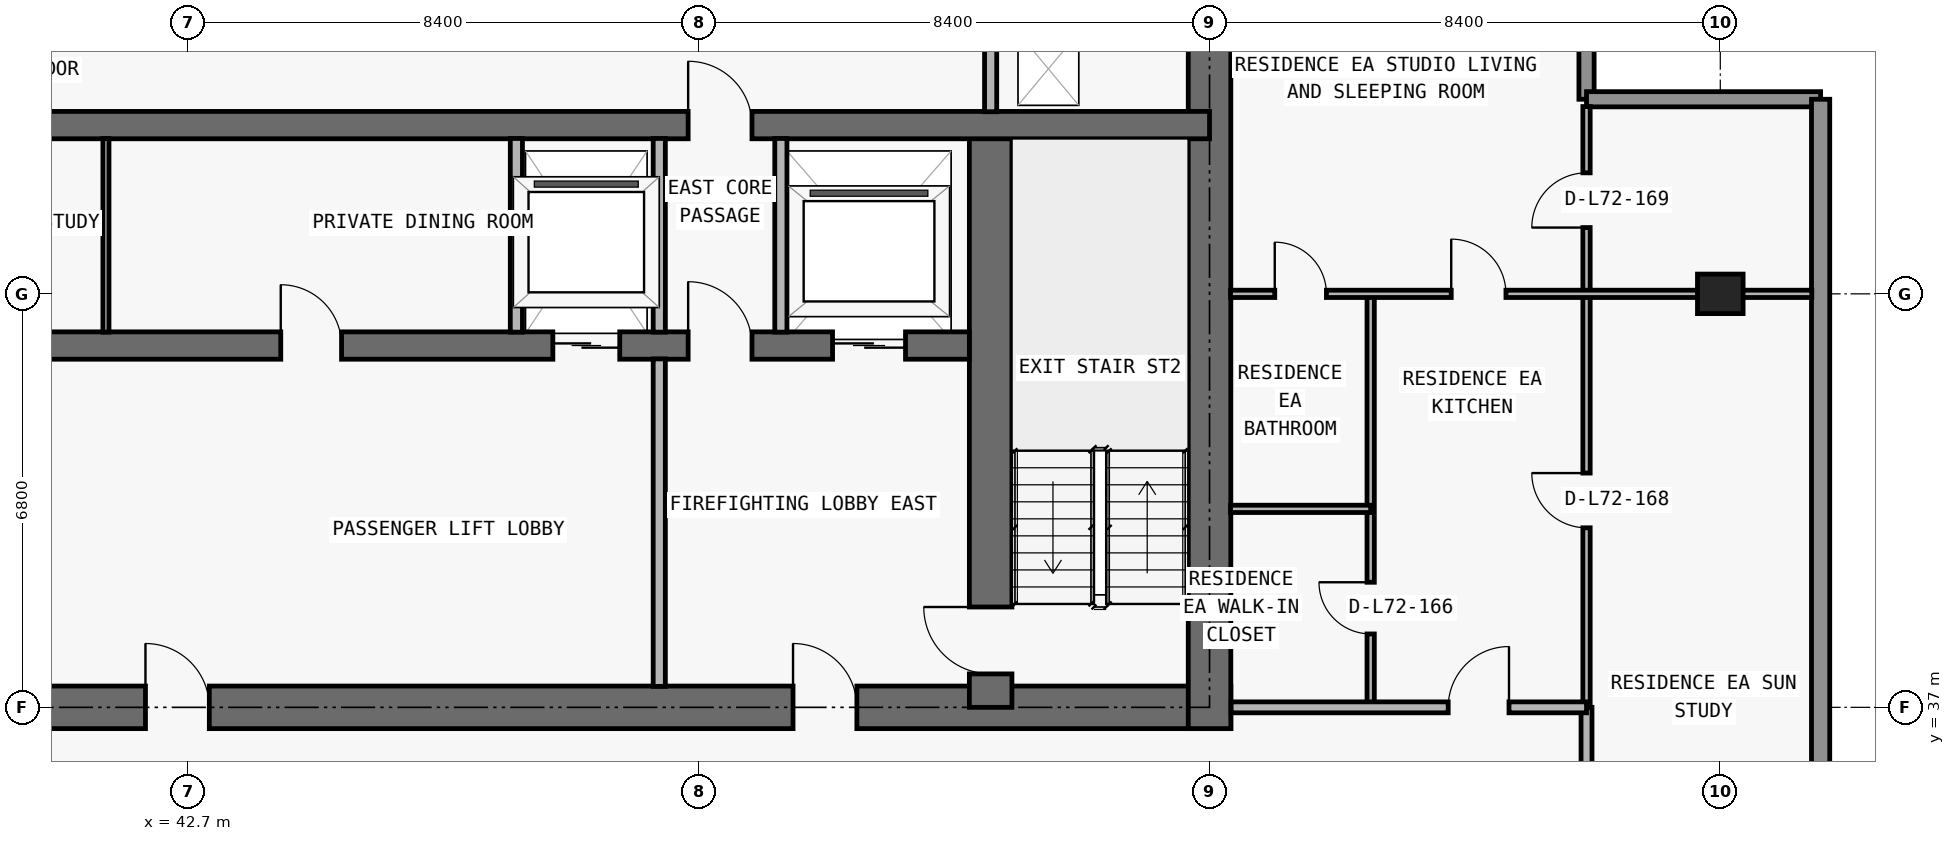
"""IFC4 building model, lengths in metres.
Left out: names, types, materials, properties, quantities, classifications, styles, units other than length and angle.
Written with IfcOpenShell. Run it as: python <this file> out.ifc"""

import sys

from ifc_helpers import new_model, si_unit, direction, frame, frame_2d, origin, origin_2d, place, context, subcontext, project, spatial, rectangle, extrude, element, fill, save


model = new_model("IFC4")
c1 = context("Model", 3, precision=1e-05, world=origin(), true_north=direction((0.0, 1.0)))
c2 = subcontext(c1, "Body", "Model", "MODEL_VIEW")
j1 = project(units=[si_unit("LENGTHUNIT", "METRE"), si_unit("PLANEANGLEUNIT", "RADIAN")], contexts=[c1])
p1 = place(None, origin())
s1 = spatial("IfcSite", under=j1, at=p1, CompositionType="ELEMENT")
p2 = place(p1, origin())
s2 = spatial("IfcBuilding", under=s1, at=p2, CompositionType="ELEMENT")
p3 = place(p2, frame((0.0, 0.0, 256.2)))
s3 = spatial("IfcBuildingStorey", under=s2, at=p3, CompositionType="ELEMENT", Elevation=256.2)
p4 = place(p3, frame((67.9, 43.8, 0.0), z_axis=(0.0, 0.0, 1.0), x_axis=(1.0, 0.0, 0.0)))
e1 = element("IfcColumn", 1, at=p4, inside=s3, PredefinedType="COLUMN", context=c2, shape_type="SweptSolid", body=[
    extrude(rectangle(XDim=0.75, YDim=0.65, at=origin_2d()), origin(), (0.0, 0.0, 1.0), 3.05),
])
p5 = place(p3, frame((17.95, 37.0, 0.0), z_axis=(0.0, 0.0, 1.0), x_axis=(1.0, 0.0, 0.0)))
e2 = element("IfcWall", 2, at=p5, inside=s3, PredefinedType="SHEAR", context=c2, shape_type="SweptSolid", body=[
    extrude(rectangle(XDim=41.9, YDim=0.7, at=frame_2d((20.95, 0.0))), origin(), (0.0, 0.0, 1.0), 3.05),
])
p6 = place(p5, frame((14.35, 0.0, 0.0)))
e3 = element("IfcOpeningElement", 3, at=p6, cuts=e2, PredefinedType="OPENING", context=c2, shape_type="SweptSolid", body=[
    extrude(rectangle(XDim=1.1, YDim=2.15, at=frame_2d((0.55, 1.075))), frame((0.0, 0.36, 0.0), z_axis=(0.0, -1.0, 0.0), x_axis=(1.0, 0.0, 0.0)), (0.0, 0.0, 1.0), 0.72),
])
p7 = place(p5, frame((6.2, 0.0, 0.0)))
e4 = element("IfcOpeningElement", 4, at=p7, cuts=e2, PredefinedType="OPENING", context=c2, shape_type="SweptSolid", body=[
    extrude(rectangle(XDim=1.05, YDim=2.15, at=frame_2d((0.525, 1.075))), frame((0.0, 0.36, 0.0), z_axis=(0.0, -1.0, 0.0), x_axis=(1.0, 0.0, 0.0)), (0.0, 0.0, 1.0), 0.72),
])
p8 = place(p5, frame((34.7, 0.0, 0.0)))
e5 = element("IfcOpeningElement", 5, at=p8, cuts=e2, PredefinedType="OPENING", context=c2, shape_type="SweptSolid", body=[
    extrude(rectangle(XDim=1.05, YDim=2.15, at=frame_2d((0.525, 1.075))), frame((0.0, 0.36, 0.0), z_axis=(0.0, -1.0, 0.0), x_axis=(1.0, 0.0, 0.0)), (0.0, 0.0, 1.0), 0.72),
])
p9 = place(p5, frame((10.812, 0.0, 0.0)))
e6 = element("IfcOpeningElement", 6, at=p9, cuts=e2, PredefinedType="OPENING", context=c2, shape_type="SweptSolid", body=[
    extrude(rectangle(XDim=1.05, YDim=2.15, at=frame_2d((0.525, 1.075))), frame((0.0, 0.36, 0.0), z_axis=(0.0, -1.0, 0.0), x_axis=(1.0, 0.0, 0.0)), (0.0, 0.0, 1.0), 0.72),
])
p10 = place(p5, frame((24.05, 0.0, 0.0)))
e7 = element("IfcOpeningElement", 7, at=p10, cuts=e2, PredefinedType="OPENING", context=c2, shape_type="SweptSolid", body=[
    extrude(rectangle(XDim=1.05, YDim=2.15, at=frame_2d((0.525, 1.075))), frame((0.0, 0.36, 0.0), z_axis=(0.0, -1.0, 0.0), x_axis=(1.0, 0.0, 0.0)), (0.0, 0.0, 1.0), 0.72),
])
p11 = place(p3, frame((59.5, 36.65, 0.0), z_axis=(0.0, 0.0, 1.0), x_axis=(0.0, 1.0, 0.0)))
e8 = element("IfcWall", 8, at=p11, inside=s3, PredefinedType="SHEAR", context=c2, shape_type="SweptSolid", body=[
    extrude(rectangle(XDim=13.95, YDim=0.7, at=frame_2d((6.975, 0.0))), origin(), (0.0, 0.0, 1.0), 3.05),
])
p12 = place(p3, frame((55.9, 37.0, 0.0), z_axis=(0.0, 0.0, 1.0), x_axis=(0.0, 1.0, 0.0)))
e9 = element("IfcWall", 9, at=p12, inside=s3, PredefinedType="SHEAR", context=c2, shape_type="SweptSolid", body=[
    extrude(rectangle(XDim=9.575, YDim=0.7, at=frame_2d((4.788, 0.0))), origin(), (0.0, 0.0, 1.0), 3.05),
])
p13 = place(p12, frame((0.55, 0.0, 0.0)))
e10 = element("IfcOpeningElement", 10, at=p13, cuts=e9, PredefinedType="OPENING", context=c2, shape_type="SweptSolid", body=[
    extrude(rectangle(XDim=1.1, YDim=2.15, at=frame_2d((0.55, 1.075))), frame((0.0, 0.36, 0.0), z_axis=(0.0, -1.0, 0.0), x_axis=(1.0, 0.0, 0.0)), (0.0, 0.0, 1.0), 0.72),
])
p14 = place(p3, frame((22.25, 42.95, 0.0), z_axis=(0.0, 0.0, 1.0), x_axis=(1.0, 0.0, 0.0)))
e11 = element("IfcWall", 11, at=p14, inside=s3, PredefinedType="SHEAR", context=c2, shape_type="SweptSolid", body=[
    extrude(rectangle(XDim=33.3, YDim=0.45, at=frame_2d((16.65, 0.0))), origin(), (0.0, 0.0, 1.0), 3.05),
])
p15 = place(p14, frame((1.05, 0.0, 0.0)))
e12 = element("IfcOpeningElement", 12, at=p15, cuts=e11, PredefinedType="OPENING", context=c2, shape_type="SweptSolid", body=[
    extrude(rectangle(XDim=1.2, YDim=2.2, at=frame_2d((0.6, 1.1))), frame((0.0, 0.235, 0.0), z_axis=(0.0, -1.0, 0.0), x_axis=(1.0, 0.0, 0.0)), (0.0, 0.0, 1.0), 0.47),
])
p16 = place(p14, frame((31.05, 0.0, 0.0)))
e13 = element("IfcOpeningElement", 13, at=p16, cuts=e11, PredefinedType="OPENING", context=c2, shape_type="SweptSolid", body=[
    extrude(rectangle(XDim=1.2, YDim=2.2, at=frame_2d((0.6, 1.1))), frame((0.0, 0.235, 0.0), z_axis=(0.0, -1.0, 0.0), x_axis=(1.0, 0.0, 0.0)), (0.0, 0.0, 1.0), 0.47),
])
p17 = place(p14, frame((26.45, 0.0, 0.0)))
e14 = element("IfcOpeningElement", 14, at=p17, cuts=e11, PredefinedType="OPENING", context=c2, shape_type="SweptSolid", body=[
    extrude(rectangle(XDim=1.1, YDim=2.2, at=frame_2d((0.55, 1.1))), frame((0.0, 0.235, 0.0), z_axis=(0.0, -1.0, 0.0), x_axis=(1.0, 0.0, 0.0)), (0.0, 0.0, 1.0), 0.47),
])
p18 = place(p14, frame((5.95, 0.0, 0.0)))
e15 = element("IfcOpeningElement", 15, at=p18, cuts=e11, PredefinedType="OPENING", context=c2, shape_type="SweptSolid", body=[
    extrude(rectangle(XDim=1.1, YDim=2.2, at=frame_2d((0.55, 1.1))), frame((0.0, 0.235, 0.0), z_axis=(0.0, -1.0, 0.0), x_axis=(1.0, 0.0, 0.0)), (0.0, 0.0, 1.0), 0.47),
])
p19 = place(p14, frame((3.625, 0.0, 0.0)))
e16 = element("IfcOpeningElement", 16, at=p19, cuts=e11, PredefinedType="OPENING", context=c2, shape_type="SweptSolid", body=[
    extrude(rectangle(XDim=1.05, YDim=2.15, at=frame_2d((0.525, 1.075))), frame((0.0, 0.235, 0.0), z_axis=(0.0, -1.0, 0.0), x_axis=(1.0, 0.0, 0.0)), (0.0, 0.0, 1.0), 0.47),
])
p20 = place(p14, frame((28.675, 0.0, 0.0)))
e17 = element("IfcOpeningElement", 17, at=p20, cuts=e11, PredefinedType="OPENING", context=c2, shape_type="SweptSolid", body=[
    extrude(rectangle(XDim=1.05, YDim=2.15, at=frame_2d((0.525, 1.075))), frame((0.0, 0.235, 0.0), z_axis=(0.0, -1.0, 0.0), x_axis=(1.0, 0.0, 0.0)), (0.0, 0.0, 1.0), 0.47),
])
p21 = place(p14, frame((15.225, 0.0, 0.0)))
e18 = element("IfcOpeningElement", 18, at=p21, cuts=e11, PredefinedType="OPENING", context=c2, shape_type="SweptSolid", body=[
    extrude(rectangle(XDim=1.0, YDim=2.2, at=frame_2d((0.5, 1.1))), frame((0.0, 0.235, 0.0), z_axis=(0.0, -1.0, 0.0), x_axis=(1.0, 0.0, 0.0)), (0.0, 0.0, 1.0), 0.47),
])
p22 = place(p14, frame((21.975, 0.0, 0.0)))
e19 = element("IfcOpeningElement", 19, at=p22, cuts=e11, PredefinedType="OPENING", context=c2, shape_type="SweptSolid", body=[
    extrude(rectangle(XDim=1.0, YDim=2.2, at=frame_2d((0.5, 1.1))), frame((0.0, 0.235, 0.0), z_axis=(0.0, -1.0, 0.0), x_axis=(1.0, 0.0, 0.0)), (0.0, 0.0, 1.0), 0.47),
])
p23 = place(p3, frame((18.3, 46.575, 0.0), z_axis=(0.0, 0.0, 1.0), x_axis=(1.0, 0.0, 0.0)))
e20 = element("IfcWall", 20, at=p23, inside=s3, PredefinedType="SHEAR", context=c2, shape_type="SweptSolid", body=[
    extrude(rectangle(XDim=41.2, YDim=0.45, at=frame_2d((20.6, 0.0))), origin(), (0.0, 0.0, 1.0), 3.05),
])
p24 = place(p23, frame((7.575, 0.0, 0.0)))
e21 = element("IfcOpeningElement", 21, at=p24, cuts=e20, PredefinedType="OPENING", context=c2, shape_type="SweptSolid", body=[
    extrude(rectangle(XDim=1.05, YDim=2.15, at=frame_2d((0.525, 1.075))), frame((0.0, 0.235, 0.0), z_axis=(0.0, -1.0, 0.0), x_axis=(1.0, 0.0, 0.0)), (0.0, 0.0, 1.0), 0.47),
])
p25 = place(p23, frame((32.625, 0.0, 0.0)))
e22 = element("IfcOpeningElement", 22, at=p25, cuts=e20, PredefinedType="OPENING", context=c2, shape_type="SweptSolid", body=[
    extrude(rectangle(XDim=1.05, YDim=2.15, at=frame_2d((0.525, 1.075))), frame((0.0, 0.235, 0.0), z_axis=(0.0, -1.0, 0.0), x_axis=(1.0, 0.0, 0.0)), (0.0, 0.0, 1.0), 0.47),
])
p26 = place(p3, frame((65.7, 50.45, 0.0), z_axis=(0.0, 0.0, 1.0), x_axis=(0.0, -1.0, 0.0)))
e23 = element("IfcWall", 23, at=p26, inside=s3, PredefinedType="ELEMENTEDWALL", context=c2, shape_type="SweptSolid", body=[
    extrude(rectangle(XDim=3.45, YDim=0.25, at=frame_2d((1.725, 0.0))), origin(), (0.0, 0.0, 1.0), 3.05),
])
p27 = place(p3, frame((65.7, 47.0, 0.0), z_axis=(0.0, 0.0, 1.0), x_axis=(1.0, 0.0, 0.0)))
e24 = element("IfcWall", 24, at=p27, inside=s3, PredefinedType="ELEMENTEDWALL", context=c2, shape_type="SweptSolid", body=[
    extrude(rectangle(XDim=3.85, YDim=0.25, at=frame_2d((1.925, 0.0))), origin(), (0.0, 0.0, 1.0), 3.05),
])
p28 = place(p3, frame((69.55, 47.0, 0.0), z_axis=(0.0, 0.0, 1.0), x_axis=(0.0, -1.0, 0.0)))
e25 = element("IfcWall", 25, at=p28, inside=s3, PredefinedType="STANDARD", context=c2, shape_type="SweptSolid", body=[
    extrude(rectangle(XDim=16.85, YDim=0.3, at=frame_2d((8.425, 0.0))), origin(), (0.0, 0.0, 1.0), 3.05),
])
p29 = place(p3, frame((41.35, 43.17, 0.0), z_axis=(0.0, 0.0, 1.0), x_axis=(0.0, 1.0, 0.0)))
e26 = element("IfcWall", 26, at=p29, inside=s3, PredefinedType="MOVABLE", context=c2, shape_type="SweptSolid", body=[
    extrude(rectangle(XDim=3.185, YDim=0.1, at=frame_2d((1.593, 0.0))), origin(), (0.0, 0.0, 1.0), 3.05),
])
p30 = place(p3, frame((48.1, 43.17, 0.0), z_axis=(0.0, 0.0, 1.0), x_axis=(0.0, 1.0, 0.0)))
e27 = element("IfcWall", 27, at=p30, inside=s3, PredefinedType="PARTITIONING", context=c2, shape_type="SweptSolid", body=[
    extrude(rectangle(XDim=3.185, YDim=0.2, at=frame_2d((1.593, 0.0))), origin(), (0.0, 0.0, 1.0), 3.05),
])
p31 = place(p3, frame((50.45, 37.345, 0.0), z_axis=(0.0, 0.0, 1.0), x_axis=(0.0, 1.0, 0.0)))
e28 = element("IfcWall", 28, at=p31, inside=s3, PredefinedType="PARTITIONING", context=c2, shape_type="SweptSolid", body=[
    extrude(rectangle(XDim=5.385, YDim=0.2, at=frame_2d((2.692, 0.0))), origin(), (0.0, 0.0, 1.0), 3.05),
])
for number, where, z_axis, x_axis in (
    (29, (50.45, 43.17, 0.0), (0.0, 0.0, 1.0), (0.0, 1.0, 0.0)),
    (30, (52.45, 43.17, 0.0), (0.0, 0.0, 1.0), (0.0, 1.0, 0.0)),
):
    element("IfcWall", number, at=place(p3, frame(where, z_axis=z_axis, x_axis=x_axis)), inside=s3, PredefinedType="PARTITIONING", context=c2, shape_type="SweptSolid", body=[
        extrude(rectangle(XDim=3.185, YDim=0.2, at=frame_2d((1.593, 0.0))), origin(), (0.0, 0.0, 1.0), 3.05),
    ])
p32 = place(p3, frame((55.9, 46.795, 0.0), z_axis=(0.0, 0.0, 1.0), x_axis=(0.0, 1.0, 0.0)))
e31 = element("IfcWall", 31, at=p32, inside=s3, PredefinedType="PARTITIONING", context=c2, shape_type="SweptSolid", body=[
    extrude(rectangle(XDim=3.16, YDim=0.2, at=frame_2d((1.58, 0.0))), origin(), (0.0, 0.0, 1.0), 3.05),
])
p33 = place(p3, frame((62.15, 37.0, 0.0), z_axis=(0.0, 0.0, 1.0), x_axis=(0.0, 1.0, 0.0)))
e32 = element("IfcWall", 32, at=p33, inside=s3, PredefinedType="PARTITIONING", context=c2, shape_type="SweptSolid", body=[
    extrude(rectangle(XDim=6.8, YDim=0.12, at=frame_2d((3.4, 0.0))), origin(), (0.0, 0.0, 1.0), 2.679),
])
p34 = place(p33, frame((1.207, 0.0, 0.0)))
e33 = element("IfcOpeningElement", 33, at=p34, cuts=e32, PredefinedType="OPENING", context=c2, shape_type="SweptSolid", body=[
    extrude(rectangle(XDim=0.85, YDim=2.1, at=frame_2d((0.425, 1.05))), frame((0.0, 0.07, 0.0), z_axis=(0.0, -1.0, 0.0), x_axis=(1.0, 0.0, 0.0)), (0.0, 0.0, 1.0), 0.14),
])
p35 = place(p3, frame((65.7, 34.305, 0.0), z_axis=(0.0, 0.0, 1.0), x_axis=(0.0, 1.0, 0.0)))
e34 = element("IfcWall", 34, at=p35, inside=s3, PredefinedType="PARTITIONING", context=c2, shape_type="SweptSolid", body=[
    extrude(rectangle(XDim=2.695, YDim=0.18, at=frame_2d((1.348, 0.0))), origin(), (0.0, 0.0, 1.0), 3.05),
])
p36 = place(p3, frame((65.7, 37.005, 0.0), z_axis=(0.0, 0.0, 1.0), x_axis=(0.0, 1.0, 0.0)))
e35 = element("IfcWall", 35, at=p36, inside=s3, PredefinedType="PARTITIONING", context=c2, shape_type="SweptSolid", body=[
    extrude(rectangle(XDim=9.875, YDim=0.12, at=frame_2d((4.938, 0.0))), origin(), (0.0, 0.0, 1.0), 3.05),
])
p37 = place(p36, frame((2.948, 0.0, 0.0)))
e36 = element("IfcOpeningElement", 36, at=p37, cuts=e35, PredefinedType="OPENING", context=c2, shape_type="SweptSolid", body=[
    extrude(rectangle(XDim=0.9, YDim=2.15, at=frame_2d((0.45, 1.075))), frame((0.0, 0.07, 0.0), z_axis=(0.0, -1.0, 0.0), x_axis=(1.0, 0.0, 0.0)), (0.0, 0.0, 1.0), 0.14),
])
p38 = place(p36, frame((7.885, 0.0, 0.0)))
e37 = element("IfcOpeningElement", 37, at=p38, cuts=e35, PredefinedType="OPENING", context=c2, shape_type="SweptSolid", body=[
    extrude(rectangle(XDim=0.9, YDim=2.15, at=frame_2d((0.45, 1.075))), frame((0.0, 0.07, 0.0), z_axis=(0.0, -1.0, 0.0), x_axis=(1.0, 0.0, 0.0)), (0.0, 0.0, 1.0), 0.14),
])
p39 = place(p3, frame((59.855, 37.0, 0.0), z_axis=(0.0, 0.0, 1.0), x_axis=(1.0, 0.0, 0.0)))
e38 = element("IfcWall", 38, at=p39, inside=s3, PredefinedType="PARTITIONING", context=c2, shape_type="SweptSolid", body=[
    extrude(rectangle(XDim=5.845, YDim=0.18, at=frame_2d((2.922, 0.0))), origin(), (0.0, 0.0, 1.0), 3.05),
])
p40 = place(p39, frame((3.57, 0.0, 0.0)))
e39 = element("IfcOpeningElement", 39, at=p40, cuts=e38, PredefinedType="OPENING", context=c2, shape_type="SweptSolid", body=[
    extrude(rectangle(XDim=1.0, YDim=2.2, at=frame_2d((0.5, 1.1))), frame((0.0, 0.1, 0.0), z_axis=(0.0, -1.0, 0.0), x_axis=(1.0, 0.0, 0.0)), (0.0, 0.0, 1.0), 0.2),
])
p41 = place(p3, frame((59.845, 40.264, 0.0), z_axis=(0.0, 0.0, 1.0), x_axis=(1.0, 0.0, 0.0)))
e40 = element("IfcWall", 40, at=p41, inside=s3, PredefinedType="PARTITIONING", context=c2, shape_type="SweptSolid", body=[
    extrude(rectangle(XDim=2.305, YDim=0.12, at=frame_2d((1.152, 0.0))), origin(), (0.0, 0.0, 1.0), 3.05),
])
p42 = place(p3, frame((59.845, 43.8, 0.0), z_axis=(0.0, 0.0, 1.0), x_axis=(1.0, 0.0, 0.0)))
e41 = element("IfcWall", 41, at=p42, inside=s3, PredefinedType="PARTITIONING", context=c2, shape_type="SweptSolid", body=[
    extrude(rectangle(XDim=9.56, YDim=0.12, at=frame_2d((4.78, 0.0))), origin(), (0.0, 0.0, 1.0), 2.418),
])
p43 = place(p42, frame((3.63, 0.0, 0.0)))
e42 = element("IfcOpeningElement", 42, at=p43, cuts=e41, PredefinedType="OPENING", context=c2, shape_type="SweptSolid", body=[
    extrude(rectangle(XDim=0.9, YDim=2.15, at=frame_2d((0.45, 1.075))), frame((0.0, 0.07, 0.0), z_axis=(0.0, -1.0, 0.0), x_axis=(1.0, 0.0, 0.0)), (0.0, 0.0, 1.0), 0.14),
])
p44 = place(p42, frame((0.728, 0.0, 0.0)))
e43 = element("IfcOpeningElement", 43, at=p44, cuts=e41, PredefinedType="OPENING", context=c2, shape_type="SweptSolid", body=[
    extrude(rectangle(XDim=0.85, YDim=2.1, at=frame_2d((0.425, 1.05))), frame((0.0, 0.07, 0.0), z_axis=(0.0, -1.0, 0.0), x_axis=(1.0, 0.0, 0.0)), (0.0, 0.0, 1.0), 0.14),
])
p45 = place(p16, origin())
e44 = element("IfcDoor", 44, at=p45, inside=s3, OperationType="DOUBLE_DOOR_SLIDING", PredefinedType="DOOR", context=c2, shape_type="SweptSolid", body=[
    extrude(rectangle(XDim=1.2, YDim=2.2, at=frame_2d((0.6, 1.1))), frame((0.0, 0.025, 0.0), z_axis=(0.0, -1.0, 0.0), x_axis=(1.0, 0.0, 0.0)), (0.0, 0.0, 1.0), 0.05),
])
fill(e13, e44)
p46 = place(p17, origin())
e45 = element("IfcDoor", 45, at=p46, inside=s3, OperationType="DOUBLE_DOOR_SLIDING", PredefinedType="DOOR", context=c2, shape_type="SweptSolid", body=[
    extrude(rectangle(XDim=1.1, YDim=2.2, at=frame_2d((0.55, 1.1))), frame((0.0, 0.025, 0.0), z_axis=(0.0, -1.0, 0.0), x_axis=(1.0, 0.0, 0.0)), (0.0, 0.0, 1.0), 0.05),
])
fill(e14, e45)
p47 = place(p8, origin())
e46 = element("IfcDoor", 46, at=p47, inside=s3, OperationType="SINGLE_SWING_LEFT", PredefinedType="DOOR", context=c2, shape_type="SweptSolid", body=[
    extrude(rectangle(XDim=1.05, YDim=2.15, at=frame_2d((0.525, 1.075))), frame((0.0, 0.025, 0.0), z_axis=(0.0, -1.0, 0.0), x_axis=(1.0, 0.0, 0.0)), (0.0, 0.0, 1.0), 0.05),
])
fill(e5, e46)
p48 = place(p13, origin())
e47 = element("IfcDoor", 47, at=p48, inside=s3, OperationType="SINGLE_SWING_RIGHT", PredefinedType="DOOR", context=c2, shape_type="SweptSolid", body=[
    extrude(rectangle(XDim=1.1, YDim=2.15, at=frame_2d((0.55, 1.075))), frame((0.0, 0.025, 0.0), z_axis=(0.0, -1.0, 0.0), x_axis=(1.0, 0.0, 0.0)), (0.0, 0.0, 1.0), 0.05),
])
fill(e10, e47)
p49 = place(p20, origin())
e48 = element("IfcDoor", 48, at=p49, inside=s3, OperationType="SINGLE_SWING_LEFT", PredefinedType="DOOR", context=c2, shape_type="SweptSolid", body=[
    extrude(rectangle(XDim=1.05, YDim=2.15, at=frame_2d((0.525, 1.075))), frame((0.0, 0.025, 0.0), z_axis=(0.0, -1.0, 0.0), x_axis=(1.0, 0.0, 0.0)), (0.0, 0.0, 1.0), 0.05),
])
fill(e17, e48)
p50 = place(p10, origin())
e49 = element("IfcDoor", 49, at=p50, inside=s3, OperationType="SINGLE_SWING_LEFT", PredefinedType="DOOR", context=c2, shape_type="SweptSolid", body=[
    extrude(rectangle(XDim=1.05, YDim=2.15, at=frame_2d((0.525, 1.075))), frame((0.0, 0.025, 0.0), z_axis=(0.0, -1.0, 0.0), x_axis=(1.0, 0.0, 0.0)), (0.0, 0.0, 1.0), 0.05),
])
fill(e7, e49)
p51 = place(p22, origin())
e50 = element("IfcDoor", 50, at=p51, inside=s3, OperationType="SINGLE_SWING_LEFT", PredefinedType="DOOR", context=c2, shape_type="SweptSolid", body=[
    extrude(rectangle(XDim=1.0, YDim=2.2, at=frame_2d((0.5, 1.1))), frame((0.0, 0.025, 0.0), z_axis=(0.0, -1.0, 0.0), x_axis=(1.0, 0.0, 0.0)), (0.0, 0.0, 1.0), 0.05),
])
fill(e19, e50)
p52 = place(p25, origin())
e51 = element("IfcDoor", 51, at=p52, inside=s3, OperationType="SINGLE_SWING_LEFT", PredefinedType="DOOR", context=c2, shape_type="SweptSolid", body=[
    extrude(rectangle(XDim=1.05, YDim=2.15, at=frame_2d((0.525, 1.075))), frame((0.0, 0.025, 0.0), z_axis=(0.0, -1.0, 0.0), x_axis=(1.0, 0.0, 0.0)), (0.0, 0.0, 1.0), 0.05),
])
fill(e22, e51)
p53 = place(p40, origin())
e52 = element("IfcDoor", 52, at=p53, inside=s3, OperationType="SINGLE_SWING_RIGHT", PredefinedType="DOOR", context=c2, shape_type="SweptSolid", body=[
    extrude(rectangle(XDim=1.0, YDim=2.2, at=frame_2d((0.5, 1.1))), frame((0.0, 0.025, 0.0), z_axis=(0.0, -1.0, 0.0), x_axis=(1.0, 0.0, 0.0)), (0.0, 0.0, 1.0), 0.05),
])
fill(e39, e52)
p54 = place(p43, origin())
e53 = element("IfcDoor", 53, at=p54, inside=s3, OperationType="SINGLE_SWING_LEFT", PredefinedType="DOOR", context=c2, shape_type="SweptSolid", body=[
    extrude(rectangle(XDim=0.9, YDim=2.15, at=frame_2d((0.45, 1.075))), frame((0.0, 0.025, 0.0), z_axis=(0.0, -1.0, 0.0), x_axis=(1.0, 0.0, 0.0)), (0.0, 0.0, 1.0), 0.05),
])
fill(e42, e53)
p55 = place(p34, origin())
e54 = element("IfcDoor", 54, at=p55, inside=s3, OperationType="SINGLE_SWING_RIGHT", PredefinedType="DOOR", context=c2, shape_type="SweptSolid", body=[
    extrude(rectangle(XDim=0.85, YDim=2.1, at=frame_2d((0.425, 1.05))), frame((0.0, 0.025, 0.0), z_axis=(0.0, -1.0, 0.0), x_axis=(1.0, 0.0, 0.0)), (0.0, 0.0, 1.0), 0.05),
])
fill(e33, e54)
p56 = place(p44, origin())
e55 = element("IfcDoor", 55, at=p56, inside=s3, OperationType="SINGLE_SWING_LEFT", PredefinedType="DOOR", context=c2, shape_type="SweptSolid", body=[
    extrude(rectangle(XDim=0.85, YDim=2.1, at=frame_2d((0.425, 1.05))), frame((0.0, 0.025, 0.0), z_axis=(0.0, -1.0, 0.0), x_axis=(1.0, 0.0, 0.0)), (0.0, 0.0, 1.0), 0.05),
])
fill(e43, e55)
p57 = place(p37, origin())
e56 = element("IfcDoor", 56, at=p57, inside=s3, OperationType="SINGLE_SWING_RIGHT", PredefinedType="DOOR", context=c2, shape_type="SweptSolid", body=[
    extrude(rectangle(XDim=0.9, YDim=2.15, at=frame_2d((0.45, 1.075))), frame((0.0, 0.025, 0.0), z_axis=(0.0, -1.0, 0.0), x_axis=(1.0, 0.0, 0.0)), (0.0, 0.0, 1.0), 0.05),
])
fill(e36, e56)
p58 = place(p38, origin())
e57 = element("IfcDoor", 57, at=p58, inside=s3, OperationType="SINGLE_SWING_LEFT", PredefinedType="DOOR", context=c2, shape_type="SweptSolid", body=[
    extrude(rectangle(XDim=0.9, YDim=2.15, at=frame_2d((0.45, 1.075))), frame((0.0, 0.025, 0.0), z_axis=(0.0, -1.0, 0.0), x_axis=(1.0, 0.0, 0.0)), (0.0, 0.0, 1.0), 0.05),
])
fill(e37, e57)
save(model, sys.argv[1])
